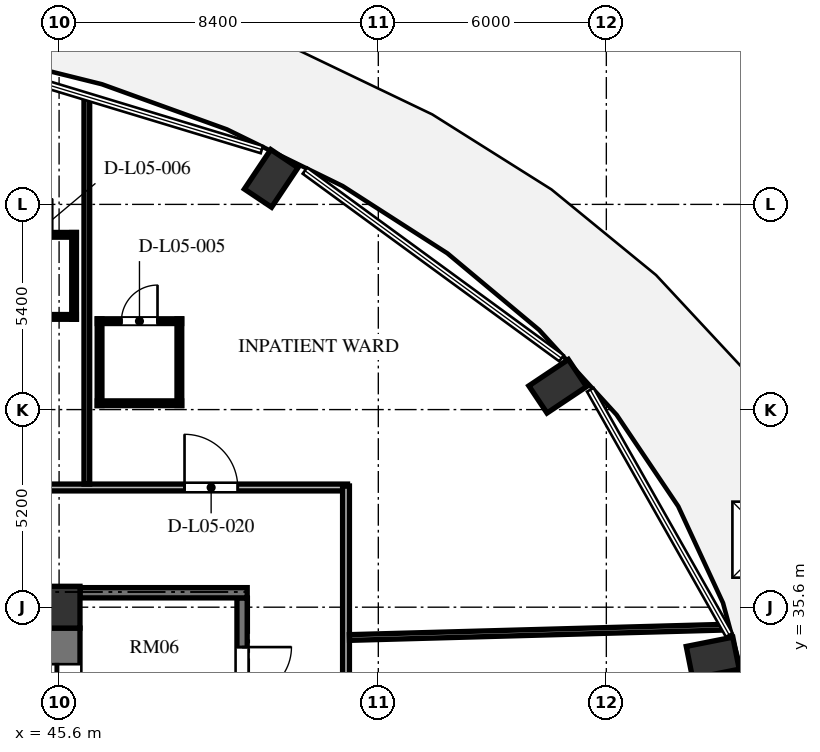
"""IFC4 building model, lengths in metres.
Left out: names, types, materials, properties, quantities, classifications, styles, units other than length and angle.
Written with IfcOpenShell. Run it as: python <this file> out.ifc"""

import sys

from ifc_helpers import new_model, si_unit, direction, frame, frame_2d, origin, origin_2d, place, context, subcontext, project, spatial, rectangle, extrude, element, fill, save


model = new_model("IFC4")
c1 = context("Model", 3, precision=1e-05, world=origin(), true_north=direction((0.0, 1.0)))
c2 = subcontext(c1, "Body", "Model", "MODEL_VIEW")
j1 = project(units=[si_unit("LENGTHUNIT", "METRE"), si_unit("PLANEANGLEUNIT", "RADIAN")], contexts=[c1])
p1 = place(None, origin())
s1 = spatial("IfcSite", under=j1, at=p1, CompositionType="ELEMENT")
p2 = place(p1, origin())
s2 = spatial("IfcBuilding", under=s1, at=p2, CompositionType="ELEMENT")
p3 = place(p2, frame((0.0, 0.0, 25.2)))
s3 = spatial("IfcBuildingStorey", under=s2, at=p3, CompositionType="ELEMENT", Elevation=25.2)
for number, where, z_axis, x_axis in (
    (1, (62.8, 34.268, 0.0), (0.0, 0.0, 1.0), (0.981, 0.195, 0.0)),
    (2, (58.72, 41.414, 0.0), (0.0, 0.0, 1.0), (0.831, 0.556, 0.0)),
    (3, (51.181, 46.884, 0.0), (0.0, 0.0, 1.0), (0.556, 0.831, 0.0)),
):
    element("IfcColumn", number, at=place(p3, frame(where, z_axis=z_axis, x_axis=x_axis)), inside=s3, PredefinedType="COLUMN", context=c2, shape_type="SweptSolid", body=[
        extrude(rectangle(XDim=1.25, YDim=0.86, at=origin_2d()), origin(), (0.0, 0.0, 1.0), 3.648),
    ])
p4 = place(p3, frame((45.6, 35.6, 0.0), z_axis=(0.0, 0.0, 1.0), x_axis=(1.0, 0.0, 0.0)))
e4 = element("IfcColumn", 4, at=p4, inside=s3, PredefinedType="COLUMN", context=c2, shape_type="SweptSolid", body=[
    extrude(rectangle(XDim=1.1, YDim=1.1, at=origin_2d()), origin(), (0.0, 0.0, 1.0), 3.648),
])
p5 = place(p3, frame((45.7, 20.95, 0.0), z_axis=(0.0, 0.0, 1.0), x_axis=(0.0, 1.0, 0.0)))
e5 = element("IfcWall", 5, at=p5, inside=s3, PredefinedType="SHEAR", context=c2, shape_type="SweptSolid", body=[
    extrude(rectangle(XDim=14.1, YDim=0.9, at=frame_2d((7.05, 0.0))), origin(), (0.0, 0.0, 1.0), 3.648),
])
p6 = place(p5, frame((11.75, 0.0, 0.0)))
e6 = element("IfcOpeningElement", 6, at=p6, cuts=e5, PredefinedType="OPENING", context=c2, shape_type="SweptSolid", body=[
    extrude(rectangle(XDim=1.4, YDim=2.3, at=frame_2d((0.7, 1.15))), frame((0.0, 0.46, 0.0), z_axis=(0.0, -1.0, 0.0), x_axis=(1.0, 0.0, 0.0)), (0.0, 0.0, 1.0), 0.92),
])
p7 = place(p5, frame((0.95, 0.0, 0.0)))
e7 = element("IfcOpeningElement", 7, at=p7, cuts=e5, PredefinedType="OPENING", context=c2, shape_type="SweptSolid", body=[
    extrude(rectangle(XDim=1.4, YDim=2.3, at=frame_2d((0.7, 1.15))), frame((0.0, 0.46, 0.0), z_axis=(0.0, -1.0, 0.0), x_axis=(1.0, 0.0, 0.0)), (0.0, 0.0, 1.0), 0.92),
])
p8 = place(p3, frame((50.415, 35.845, 0.0), z_axis=(0.0, 0.0, 1.0), x_axis=(0.0, -1.0, 0.0)))
e8 = element("IfcWall", 8, at=p8, inside=s3, PredefinedType="SHEAR", context=c2, shape_type="SweptSolid", body=[
    extrude(rectangle(XDim=15.825, YDim=0.27, at=frame_2d((7.913, 0.0))), origin(), (0.0, 0.0, 1.0), 3.648),
])
p9 = place(p8, frame((4.445, 0.0, 0.0)))
e9 = element("IfcOpeningElement", 9, at=p9, cuts=e8, PredefinedType="OPENING", context=c2, shape_type="SweptSolid", body=[
    extrude(rectangle(XDim=1.2, YDim=2.15, at=frame_2d((0.6, 1.075))), frame((0.0, 0.145, 0.0), z_axis=(0.0, -1.0, 0.0), x_axis=(1.0, 0.0, 0.0)), (0.0, 0.0, 1.0), 0.29),
])
p10 = place(p8, frame((1.295, 0.0, 0.0)))
e10 = element("IfcOpeningElement", 10, at=p10, cuts=e8, PredefinedType="OPENING", context=c2, shape_type="SweptSolid", body=[
    extrude(rectangle(XDim=1.3, YDim=2.2, at=frame_2d((0.65, 1.1))), frame((0.0, 0.145, 0.0), z_axis=(0.0, -1.0, 0.0), x_axis=(1.0, 0.0, 0.0)), (0.0, 0.0, 1.0), 0.29),
])
p11 = place(p8, frame((13.095, 0.0, 0.0)))
e11 = element("IfcOpeningElement", 11, at=p11, cuts=e8, PredefinedType="OPENING", context=c2, shape_type="SweptSolid", body=[
    extrude(rectangle(XDim=1.3, YDim=2.2, at=frame_2d((0.65, 1.1))), frame((0.0, 0.145, 0.0), z_axis=(0.0, -1.0, 0.0), x_axis=(1.0, 0.0, 0.0)), (0.0, 0.0, 1.0), 0.29),
])
p12 = place(p3, frame((46.15, 35.98, 0.0), z_axis=(0.0, 0.0, 1.0), x_axis=(1.0, 0.0, 0.0)))
e12 = element("IfcWall", 12, at=p12, inside=s3, PredefinedType="SHEAR", context=c2, shape_type="SweptSolid", body=[
    extrude(rectangle(XDim=4.4, YDim=0.27, at=frame_2d((2.2, 0.0))), origin(), (0.0, 0.0, 1.0), 3.648),
])
p13 = place(p3, frame((23.31, 38.75, 0.0), z_axis=(0.0, 0.0, 1.0), x_axis=(1.0, 0.0, 0.0)))
e13 = element("IfcWall", 13, at=p13, inside=s3, PredefinedType="PARTITIONING", context=c2, shape_type="SweptSolid", body=[
    extrude(rectangle(XDim=29.88, YDim=0.18, at=frame_2d((14.94, 0.0))), origin(), (0.0, 0.0, 1.0), 3.053),
])
p14 = place(p13, frame((25.591, 0.0, 0.0)))
e14 = element("IfcOpeningElement", 14, at=p14, cuts=e13, PredefinedType="OPENING", context=c2, shape_type="SweptSolid", body=[
    extrude(rectangle(XDim=1.4, YDim=2.2, at=frame_2d((0.7, 1.1))), frame((0.0, 0.1, 0.0), z_axis=(0.0, -1.0, 0.0), x_axis=(1.0, 0.0, 0.0)), (0.0, 0.0, 1.0), 0.2),
])
p15 = place(p13, frame((20.24, 0.0, 0.0)))
e15 = element("IfcOpeningElement", 15, at=p15, cuts=e13, PredefinedType="OPENING", context=c2, shape_type="SweptSolid", body=[
    extrude(rectangle(XDim=1.4, YDim=2.2, at=frame_2d((0.7, 1.1))), frame((0.0, 0.1, 0.0), z_axis=(0.0, -1.0, 0.0), x_axis=(1.0, 0.0, 0.0)), (0.0, 0.0, 1.0), 0.2),
])
p16 = place(p13, frame((16.075, 0.0, 0.0)))
e16 = element("IfcOpeningElement", 16, at=p16, cuts=e13, PredefinedType="OPENING", context=c2, shape_type="SweptSolid", body=[
    extrude(rectangle(XDim=1.4, YDim=2.2, at=frame_2d((0.7, 1.1))), frame((0.0, 0.1, 0.0), z_axis=(0.0, -1.0, 0.0), x_axis=(1.0, 0.0, 0.0)), (0.0, 0.0, 1.0), 0.2),
])
p17 = place(p13, frame((11.905, 0.0, 0.0)))
e17 = element("IfcOpeningElement", 17, at=p17, cuts=e13, PredefinedType="OPENING", context=c2, shape_type="SweptSolid", body=[
    extrude(rectangle(XDim=1.4, YDim=2.2, at=frame_2d((0.7, 1.1))), frame((0.0, 0.1, 0.0), z_axis=(0.0, -1.0, 0.0), x_axis=(1.0, 0.0, 0.0)), (0.0, 0.0, 1.0), 0.2),
])
p18 = place(p13, frame((7.74, 0.0, 0.0)))
e18 = element("IfcOpeningElement", 18, at=p18, cuts=e13, PredefinedType="OPENING", context=c2, shape_type="SweptSolid", body=[
    extrude(rectangle(XDim=1.4, YDim=2.2, at=frame_2d((0.7, 1.1))), frame((0.0, 0.1, 0.0), z_axis=(0.0, -1.0, 0.0), x_axis=(1.0, 0.0, 0.0)), (0.0, 0.0, 1.0), 0.2),
])
p19 = place(p13, frame((2.639, 0.0, 0.0)))
e19 = element("IfcOpeningElement", 19, at=p19, cuts=e13, PredefinedType="OPENING", context=c2, shape_type="SweptSolid", body=[
    extrude(rectangle(XDim=1.4, YDim=2.2, at=frame_2d((0.7, 1.1))), frame((0.0, 0.1, 0.0), z_axis=(0.0, -1.0, 0.0), x_axis=(1.0, 0.0, 0.0)), (0.0, 0.0, 1.0), 0.2),
])
p20 = place(p3, frame((53.15, 38.79, 0.0), z_axis=(0.0, 0.0, 1.0), x_axis=(0.0, -1.0, 0.0)))
e20 = element("IfcWall", 20, at=p20, inside=s3, PredefinedType="PARTITIONING", context=c2, shape_type="SweptSolid", body=[
    extrude(rectangle(XDim=9.43, YDim=0.18, at=frame_2d((4.715, 0.0))), origin(), (0.0, 0.0, 1.0), 3.428),
])
p21 = place(p3, frame((53.24, 34.802, 0.0), z_axis=(0.0, 0.0, 1.0), x_axis=(0.999620561748, 0.027545099924, 0.0)))
e21 = element("IfcWall", 21, at=p21, inside=s3, PredefinedType="PARTITIONING", context=c2, shape_type="SweptSolid", body=[
    extrude(rectangle(XDim=9.891, YDim=0.15, at=frame_2d((4.946, 0.0))), origin(), (0.0, 0.0, 1.0), 2.813),
])
p22 = place(p3, frame((46.33, 38.84, 0.0), z_axis=(0.0, 0.0, 1.0), x_axis=(0.0, 1.0, 0.0)))
e22 = element("IfcWall", 22, at=p22, inside=s3, PredefinedType="PARTITIONING", context=c2, shape_type="SweptSolid", body=[
    extrude(rectangle(XDim=10.185, YDim=0.15, at=frame_2d((5.092, 0.0))), origin(), (0.0, 0.0, 1.0), 3.428),
])
p23 = place(p3, frame((46.605, 43.127, 0.0), z_axis=(0.0, 0.0, 1.0), x_axis=(1.0, 0.0, 0.0)))
e23 = element("IfcWall", 23, at=p23, inside=s3, PredefinedType="PARTITIONING", context=c2, shape_type="SweptSolid", body=[
    extrude(rectangle(XDim=2.22, YDim=0.125, at=frame_2d((1.11, 0.0))), origin(), (0.0, 0.0, 1.0), 3.428),
])
p24 = place(p23, frame((0.635, 0.0, 0.0)))
e24 = element("IfcOpeningElement", 24, at=p24, cuts=e23, PredefinedType="OPENING", context=c2, shape_type="SweptSolid", body=[
    extrude(rectangle(XDim=0.95, YDim=2.1, at=frame_2d((0.475, 1.05))), frame((0.0, 0.073, 0.0), z_axis=(0.0, -1.0, 0.0), x_axis=(1.0, 0.0, 0.0)), (0.0, 0.0, 1.0), 0.145),
])
p25 = place(p3, frame((46.605, 40.967, 0.0), z_axis=(0.0, 0.0, 1.0), x_axis=(1.0, 0.0, 0.0)))
e25 = element("IfcWall", 25, at=p25, inside=s3, PredefinedType="PARTITIONING", context=c2, shape_type="SweptSolid", body=[
    extrude(rectangle(XDim=2.22, YDim=0.125, at=frame_2d((1.11, 0.0))), origin(), (0.0, 0.0, 1.0), 3.428),
])
for number, where, z_axis, x_axis in (
    (26, (48.765, 40.907, 0.0), (0.0, 0.0, 1.0), (0.0, 1.0, 0.0)),
    (27, (46.665, 40.907, 0.0), (0.0, 0.0, 1.0), (0.0, 1.0, 0.0)),
):
    element("IfcWall", number, at=place(p3, frame(where, z_axis=z_axis, x_axis=x_axis)), inside=s3, PredefinedType="PARTITIONING", context=c2, shape_type="SweptSolid", body=[
        extrude(rectangle(XDim=2.28, YDim=0.125, at=frame_2d((1.14, 0.0))), origin(), (0.0, 0.0, 1.0), 3.428),
    ])
p26 = place(p3, frame((43.835, 45.399, 0.0), z_axis=(0.0, 0.0, 1.0), x_axis=(1.0, 0.0, 0.0)))
e28 = element("IfcWall", 28, at=p26, inside=s3, PredefinedType="PARTITIONING", context=c2, shape_type="SweptSolid", body=[
    extrude(rectangle(XDim=2.22, YDim=0.125, at=frame_2d((1.11, 0.0))), origin(), (0.0, 0.0, 1.0), 3.013),
])
p27 = place(p26, frame((0.635, 0.0, 0.0)))
e29 = element("IfcOpeningElement", 29, at=p27, cuts=e28, PredefinedType="OPENING", context=c2, shape_type="SweptSolid", body=[
    extrude(rectangle(XDim=0.95, YDim=2.1, at=frame_2d((0.475, 1.05))), frame((0.0, 0.073, 0.0), z_axis=(0.0, -1.0, 0.0), x_axis=(1.0, 0.0, 0.0)), (0.0, 0.0, 1.0), 0.145),
])
p28 = place(p3, frame((43.835, 43.239, 0.0), z_axis=(0.0, 0.0, 1.0), x_axis=(1.0, 0.0, 0.0)))
e30 = element("IfcWall", 30, at=p28, inside=s3, PredefinedType="PARTITIONING", context=c2, shape_type="SweptSolid", body=[
    extrude(rectangle(XDim=2.22, YDim=0.125, at=frame_2d((1.11, 0.0))), origin(), (0.0, 0.0, 1.0), 3.053),
])
p29 = place(p3, frame((45.995, 43.179, 0.0), z_axis=(0.0, 0.0, 1.0), x_axis=(0.0, 1.0, 0.0)))
e31 = element("IfcWall", 31, at=p29, inside=s3, PredefinedType="PARTITIONING", context=c2, shape_type="SweptSolid", body=[
    extrude(rectangle(XDim=2.28, YDim=0.125, at=frame_2d((1.14, 0.0))), origin(), (0.0, 0.0, 1.0), 3.428),
])
p30 = place(p3, frame((0.0, 0.0, -0.22)))
p31 = place(p30, frame((64.318, 37.377, 0.0)))
p32 = place(p31, frame((0.0, 0.0, 0.22)))
e32 = element("IfcWindow", 32, at=p32, inside=s3, PartitioningType="SINGLE_PANEL", PredefinedType="SKYLIGHT", context=c2, shape_type="SweptSolid", body=[
    extrude(rectangle(XDim=2.0, YDim=2.0, at=origin_2d()), origin(), (0.0, 0.0, 1.0), 0.05),
])
p33 = place(p6, origin())
e33 = element("IfcDoor", 33, at=p33, inside=s3, OperationType="SLIDING_TO_LEFT", PredefinedType="DOOR", context=c2, shape_type="SweptSolid", body=[
    extrude(rectangle(XDim=1.4, YDim=2.3, at=frame_2d((0.7, 1.15))), frame((0.0, 0.025, 0.0), z_axis=(0.0, -1.0, 0.0), x_axis=(1.0, 0.0, 0.0)), (0.0, 0.0, 1.0), 0.05),
])
fill(e6, e33)
p34 = place(p10, origin())
e34 = element("IfcDoor", 34, at=p34, inside=s3, OperationType="SINGLE_SWING_LEFT", PredefinedType="DOOR", context=c2, shape_type="SweptSolid", body=[
    extrude(rectangle(XDim=1.3, YDim=2.2, at=frame_2d((0.65, 1.1))), frame((0.0, 0.025, 0.0), z_axis=(0.0, -1.0, 0.0), x_axis=(1.0, 0.0, 0.0)), (0.0, 0.0, 1.0), 0.05),
])
fill(e10, e34)
p35 = place(p24, origin())
e35 = element("IfcDoor", 35, at=p35, inside=s3, OperationType="SINGLE_SWING_RIGHT", PredefinedType="DOOR", context=c2, shape_type="SweptSolid", body=[
    extrude(rectangle(XDim=0.95, YDim=2.1, at=frame_2d((0.475, 1.05))), frame((0.0, 0.025, 0.0), z_axis=(0.0, -1.0, 0.0), x_axis=(1.0, 0.0, 0.0)), (0.0, 0.0, 1.0), 0.05),
])
fill(e24, e35)
p36 = place(p14, origin())
e36 = element("IfcDoor", 36, at=p36, inside=s3, OperationType="SINGLE_SWING_LEFT", PredefinedType="DOOR", context=c2, shape_type="SweptSolid", body=[
    extrude(rectangle(XDim=1.4, YDim=2.2, at=frame_2d((0.7, 1.1))), frame((0.0, 0.025, 0.0), z_axis=(0.0, -1.0, 0.0), x_axis=(1.0, 0.0, 0.0)), (0.0, 0.0, 1.0), 0.05),
])
fill(e14, e36)
p37 = place(p27, origin())
e37 = element("IfcDoor", 37, at=p37, inside=s3, OperationType="SINGLE_SWING_RIGHT", PredefinedType="DOOR", context=c2, shape_type="SweptSolid", body=[
    extrude(rectangle(XDim=0.95, YDim=2.1, at=frame_2d((0.475, 1.05))), frame((0.0, 0.025, 0.0), z_axis=(0.0, -1.0, 0.0), x_axis=(1.0, 0.0, 0.0)), (0.0, 0.0, 1.0), 0.05),
])
fill(e29, e37)
save(model, sys.argv[1])
